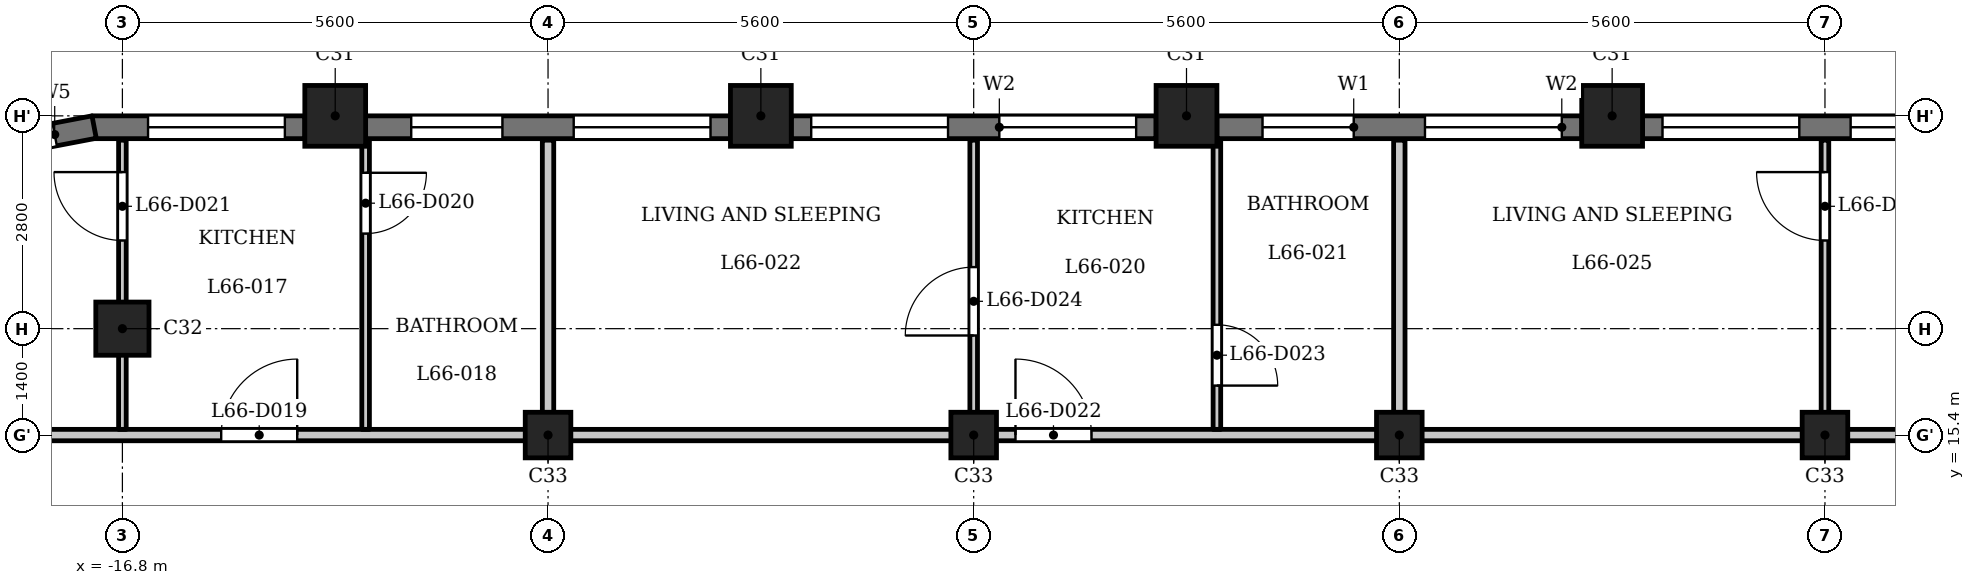
"""IFC4 building model, lengths in metres.
Left out: names, types, materials, properties, quantities, classifications, styles, units other than length and angle.
Written with IfcOpenShell. Run it as: python <this file> out.ifc"""

import sys

from ifc_helpers import new_model, si_unit, direction, frame, frame_2d, origin, origin_2d, place, context, subcontext, project, spatial, rectangle, extrude, element, fill, save


model = new_model("IFC4")
c1 = context("Model", 3, precision=1e-05, world=origin(), true_north=direction((0.0, 1.0)))
c2 = subcontext(c1, "Body", "Model", "MODEL_VIEW")
j1 = project(units=[si_unit("LENGTHUNIT", "METRE"), si_unit("PLANEANGLEUNIT", "RADIAN")], contexts=[c1])
p1 = place(None, origin())
s1 = spatial("IfcSite", under=j1, at=p1, CompositionType="ELEMENT")
p2 = place(p1, origin())
s2 = spatial("IfcBuilding", under=s1, at=p2, CompositionType="ELEMENT")
p3 = place(p2, frame((0.0, 0.0, 255.7)))
s3 = spatial("IfcBuildingStorey", under=s2, at=p3, CompositionType="ELEMENT", Elevation=255.7)
for number, where, z_axis, x_axis in (
    (1, (2.8, 19.6, 0.0), (0.0, 0.0, 1.0), (1.0, 0.0, 0.0)),
    (2, (-2.8, 19.6, 0.0), (0.0, 0.0, 1.0), (1.0, 0.0, 0.0)),
    (3, (-8.4, 19.6, 0.0), (0.0, 0.0, 1.0), (1.0, 0.0, 0.0)),
    (4, (-14.0, 19.6, 0.0), (0.0, 0.0, 1.0), (1.0, 0.0, 0.0)),
):
    element("IfcColumn", number, at=place(p3, frame(where, z_axis=z_axis, x_axis=x_axis)), inside=s3, PredefinedType="COLUMN", context=c2, shape_type="SweptSolid", body=[
        extrude(rectangle(XDim=0.8, YDim=0.8, at=origin_2d()), origin(), (0.0, 0.0, 1.0), 3.5),
    ])
p4 = place(p3, frame((-16.8, 16.8, 0.0), z_axis=(0.0, 0.0, 1.0), x_axis=(1.0, 0.0, 0.0)))
e5 = element("IfcColumn", 5, at=p4, inside=s3, PredefinedType="COLUMN", context=c2, shape_type="SweptSolid", body=[
    extrude(rectangle(XDim=0.7, YDim=0.7, at=origin_2d()), origin(), (0.0, 0.0, 1.0), 3.5),
])
for number, where, z_axis, x_axis in (
    (6, (-11.2, 15.4, 0.0), (0.0, 0.0, 1.0), (1.0, 0.0, 0.0)),
    (7, (-5.6, 15.4, 0.0), (0.0, 0.0, 1.0), (1.0, 0.0, 0.0)),
    (8, (0.0, 15.4, 0.0), (0.0, 0.0, 1.0), (1.0, 0.0, 0.0)),
    (9, (5.6, 15.4, 0.0), (0.0, 0.0, 1.0), (1.0, 0.0, 0.0)),
):
    element("IfcColumn", number, at=place(p3, frame(where, z_axis=z_axis, x_axis=x_axis)), inside=s3, PredefinedType="COLUMN", context=c2, shape_type="SweptSolid", body=[
        extrude(rectangle(XDim=0.6, YDim=0.6, at=origin_2d()), origin(), (0.0, 0.0, 1.0), 3.5),
    ])
p5 = place(p3, frame((8.0, 19.45, 0.0), z_axis=(0.0, 0.0, 1.0), x_axis=(-1.0, 0.0, 0.0)))
e10 = element("IfcWall", 10, at=p5, inside=s3, PredefinedType="SOLIDWALL", context=c2, shape_type="SweptSolid", body=[
    extrude(rectangle(XDim=4.8, YDim=0.3, at=frame_2d((2.4, 0.0))), origin(), (0.0, 0.0, 1.0), 2.55),
])
p6 = place(p5, frame((0.262, 0.0, 0.9)))
e11 = element("IfcOpeningElement", 11, at=p6, cuts=e10, PredefinedType="OPENING", context=c2, shape_type="SweptSolid", body=[
    extrude(rectangle(XDim=1.8, YDim=1.25, at=frame_2d((0.9, 0.625))), frame((0.0, 0.16, 0.0), z_axis=(0.0, -1.0, 0.0), x_axis=(1.0, 0.0, 0.0)), (0.0, 0.0, 1.0), 0.32),
])
p7 = place(p5, frame((2.738, 0.0, 0.9)))
e12 = element("IfcOpeningElement", 12, at=p7, cuts=e10, PredefinedType="OPENING", context=c2, shape_type="SweptSolid", body=[
    extrude(rectangle(XDim=1.8, YDim=1.25, at=frame_2d((0.9, 0.625))), frame((0.0, 0.16, 0.0), z_axis=(0.0, -1.0, 0.0), x_axis=(1.0, 0.0, 0.0)), (0.0, 0.0, 1.0), 0.32),
])
p8 = place(p3, frame((2.4, 19.45, 0.0), z_axis=(0.0, 0.0, 1.0), x_axis=(-1.0, 0.0, 0.0)))
e13 = element("IfcWall", 13, at=p8, inside=s3, PredefinedType="SOLIDWALL", context=c2, shape_type="SweptSolid", body=[
    extrude(rectangle(XDim=4.8, YDim=0.3, at=frame_2d((2.4, 0.0))), origin(), (0.0, 0.0, 1.0), 2.55),
])
p9 = place(p8, frame((0.262, 0.0, 0.9)))
e14 = element("IfcOpeningElement", 14, at=p9, cuts=e13, PredefinedType="OPENING", context=c2, shape_type="SweptSolid", body=[
    extrude(rectangle(XDim=1.8, YDim=1.25, at=frame_2d((0.9, 0.625))), frame((0.0, 0.16, 0.0), z_axis=(0.0, -1.0, 0.0), x_axis=(1.0, 0.0, 0.0)), (0.0, 0.0, 1.0), 0.32),
])
p10 = place(p8, frame((3.0, 0.0, 0.6)))
e15 = element("IfcOpeningElement", 15, at=p10, cuts=e13, PredefinedType="OPENING", context=c2, shape_type="SweptSolid", body=[
    extrude(rectangle(XDim=1.2, YDim=1.55, at=frame_2d((0.6, 0.775))), frame((0.0, 0.16, 0.0), z_axis=(0.0, -1.0, 0.0), x_axis=(1.0, 0.0, 0.0)), (0.0, 0.0, 1.0), 0.32),
])
p11 = place(p3, frame((-3.2, 19.45, 0.0), z_axis=(0.0, 0.0, 1.0), x_axis=(-1.0, 0.0, 0.0)))
e16 = element("IfcWall", 16, at=p11, inside=s3, PredefinedType="SOLIDWALL", context=c2, shape_type="SweptSolid", body=[
    extrude(rectangle(XDim=4.8, YDim=0.3, at=frame_2d((2.4, 0.0))), origin(), (0.0, 0.0, 1.0), 2.55),
])
p12 = place(p11, frame((0.262, 0.0, 0.9)))
e17 = element("IfcOpeningElement", 17, at=p12, cuts=e16, PredefinedType="OPENING", context=c2, shape_type="SweptSolid", body=[
    extrude(rectangle(XDim=1.8, YDim=1.25, at=frame_2d((0.9, 0.625))), frame((0.0, 0.16, 0.0), z_axis=(0.0, -1.0, 0.0), x_axis=(1.0, 0.0, 0.0)), (0.0, 0.0, 1.0), 0.32),
])
p13 = place(p11, frame((2.738, 0.0, 0.9)))
e18 = element("IfcOpeningElement", 18, at=p13, cuts=e16, PredefinedType="OPENING", context=c2, shape_type="SweptSolid", body=[
    extrude(rectangle(XDim=1.8, YDim=1.25, at=frame_2d((0.9, 0.625))), frame((0.0, 0.16, 0.0), z_axis=(0.0, -1.0, 0.0), x_axis=(1.0, 0.0, 0.0)), (0.0, 0.0, 1.0), 0.32),
])
p14 = place(p3, frame((-8.8, 19.45, 0.0), z_axis=(0.0, 0.0, 1.0), x_axis=(-1.0, 0.0, 0.0)))
e19 = element("IfcWall", 19, at=p14, inside=s3, PredefinedType="SOLIDWALL", context=c2, shape_type="SweptSolid", body=[
    extrude(rectangle(XDim=4.8, YDim=0.3, at=frame_2d((2.4, 0.0))), origin(), (0.0, 0.0, 1.0), 2.55),
])
p15 = place(p14, frame((0.262, 0.0, 0.9)))
e20 = element("IfcOpeningElement", 20, at=p15, cuts=e19, PredefinedType="OPENING", context=c2, shape_type="SweptSolid", body=[
    extrude(rectangle(XDim=1.8, YDim=1.25, at=frame_2d((0.9, 0.625))), frame((0.0, 0.16, 0.0), z_axis=(0.0, -1.0, 0.0), x_axis=(1.0, 0.0, 0.0)), (0.0, 0.0, 1.0), 0.32),
])
p16 = place(p14, frame((3.0, 0.0, 0.6)))
e21 = element("IfcOpeningElement", 21, at=p16, cuts=e19, PredefinedType="OPENING", context=c2, shape_type="SweptSolid", body=[
    extrude(rectangle(XDim=1.2, YDim=1.55, at=frame_2d((0.6, 0.775))), frame((0.0, 0.16, 0.0), z_axis=(0.0, -1.0, 0.0), x_axis=(1.0, 0.0, 0.0)), (0.0, 0.0, 1.0), 0.32),
])
p17 = place(p3, frame((-14.4, 19.45, 0.0), z_axis=(0.0, 0.0, 1.0), x_axis=(-1.0, 0.0, 0.0)))
e22 = element("IfcWall", 22, at=p17, inside=s3, PredefinedType="SOLIDWALL", context=c2, shape_type="SweptSolid", body=[
    extrude(rectangle(XDim=2.8, YDim=0.3, at=frame_2d((1.4, 0.0))), origin(), (0.0, 0.0, 1.0), 2.55),
])
p18 = place(p17, frame((0.262, 0.0, 0.9)))
e23 = element("IfcOpeningElement", 23, at=p18, cuts=e22, PredefinedType="OPENING", context=c2, shape_type="SweptSolid", body=[
    extrude(rectangle(XDim=1.8, YDim=1.25, at=frame_2d((0.9, 0.625))), frame((0.0, 0.16, 0.0), z_axis=(0.0, -1.0, 0.0), x_axis=(1.0, 0.0, 0.0)), (0.0, 0.0, 1.0), 0.32),
])
p19 = place(p3, frame((-17.172, 19.453, 0.0), z_axis=(0.0, 0.0, 1.0), x_axis=(-0.982301706131, -0.187305520826, 0.0)))
e24 = element("IfcWall", 24, at=p19, inside=s3, PredefinedType="SOLIDWALL", context=c2, shape_type="SweptSolid", body=[
    extrude(rectangle(XDim=1.856, YDim=0.3, at=frame_2d((0.928, 0.0))), origin(), (0.0, 0.0, 1.0), 2.55),
])
p20 = place(p19, frame((0.528, 0.0, 0.6)))
e25 = element("IfcOpeningElement", 25, at=p20, cuts=e24, PredefinedType="OPENING", context=c2, shape_type="SweptSolid", body=[
    extrude(rectangle(XDim=0.8, YDim=1.55, at=frame_2d((0.4, 0.775))), frame((0.0, 0.16, 0.0), z_axis=(0.0, -1.0, 0.0), x_axis=(1.0, 0.0, 0.0)), (0.0, 0.0, 1.0), 0.32),
])
p21 = place(p3, frame((-23.55, 15.4, 0.0), z_axis=(0.0, 0.0, 1.0), x_axis=(1.0, 0.0, 0.0)))
e26 = element("IfcWall", 26, at=p21, inside=s3, PredefinedType="PARTITIONING", context=c2, shape_type="SweptSolid", body=[
    extrude(rectangle(XDim=46.872, YDim=0.15, at=frame_2d((23.436, 0.0))), origin(), (0.0, 0.0, 1.0), 3.2),
])
p22 = place(p21, frame((8.05, 0.0, 0.0)))
e27 = element("IfcOpeningElement", 27, at=p22, cuts=e26, PredefinedType="OPENING", context=c2, shape_type="SweptSolid", body=[
    extrude(rectangle(XDim=1.0, YDim=2.1, at=frame_2d((0.5, 1.05))), frame((0.0, 0.085, 0.0), z_axis=(0.0, -1.0, 0.0), x_axis=(1.0, 0.0, 0.0)), (0.0, 0.0, 1.0), 0.17),
])
p23 = place(p21, frame((18.5, 0.0, 0.0)))
e28 = element("IfcOpeningElement", 28, at=p23, cuts=e26, PredefinedType="OPENING", context=c2, shape_type="SweptSolid", body=[
    extrude(rectangle(XDim=1.0, YDim=2.1, at=frame_2d((0.5, 1.05))), frame((0.0, 0.085, 0.0), z_axis=(0.0, -1.0, 0.0), x_axis=(1.0, 0.0, 0.0)), (0.0, 0.0, 1.0), 0.17),
])
p24 = place(p21, frame((30.7, 0.0, 0.0)))
e29 = element("IfcOpeningElement", 29, at=p24, cuts=e26, PredefinedType="OPENING", context=c2, shape_type="SweptSolid", body=[
    extrude(rectangle(XDim=1.0, YDim=2.1, at=frame_2d((0.5, 1.05))), frame((0.0, 0.085, 0.0), z_axis=(0.0, -1.0, 0.0), x_axis=(1.0, 0.0, 0.0)), (0.0, 0.0, 1.0), 0.17),
])
p25 = place(p21, frame((37.7, 0.0, 0.0)))
e30 = element("IfcOpeningElement", 30, at=p25, cuts=e26, PredefinedType="OPENING", context=c2, shape_type="SweptSolid", body=[
    extrude(rectangle(XDim=1.0, YDim=2.1, at=frame_2d((0.5, 1.05))), frame((0.0, 0.085, 0.0), z_axis=(0.0, -1.0, 0.0), x_axis=(1.0, 0.0, 0.0)), (0.0, 0.0, 1.0), 0.17),
])
p26 = place(p3, frame((-16.8, 15.475, 0.0), z_axis=(0.0, 0.0, 1.0), x_axis=(0.0, 1.0, 0.0)))
e31 = element("IfcWall", 31, at=p26, inside=s3, PredefinedType="PARTITIONING", context=c2, shape_type="SweptSolid", body=[
    extrude(rectangle(XDim=3.805, YDim=0.1, at=frame_2d((1.902, 0.0))), origin(), (0.0, 0.0, 1.0), 3.2),
])
p27 = place(p26, frame((2.485, 0.0, 0.0)))
e32 = element("IfcOpeningElement", 32, at=p27, cuts=e31, PredefinedType="OPENING", context=c2, shape_type="SweptSolid", body=[
    extrude(rectangle(XDim=0.9, YDim=2.1, at=frame_2d((0.45, 1.05))), frame((0.0, 0.06, 0.0), z_axis=(0.0, -1.0, 0.0), x_axis=(1.0, 0.0, 0.0)), (0.0, 0.0, 1.0), 0.12),
])
p28 = place(p3, frame((-13.6, 15.475, 0.0), z_axis=(0.0, 0.0, 1.0), x_axis=(0.0, 1.0, 0.0)))
e33 = element("IfcWall", 33, at=p28, inside=s3, PredefinedType="PARTITIONING", context=c2, shape_type="SweptSolid", body=[
    extrude(rectangle(XDim=3.805, YDim=0.1, at=frame_2d((1.902, 0.0))), origin(), (0.0, 0.0, 1.0), 3.2),
])
p29 = place(p28, frame((2.576, 0.0, 0.0)))
e34 = element("IfcOpeningElement", 34, at=p29, cuts=e33, PredefinedType="OPENING", context=c2, shape_type="SweptSolid", body=[
    extrude(rectangle(XDim=0.8, YDim=2.1, at=frame_2d((0.4, 1.05))), frame((0.0, 0.06, 0.0), z_axis=(0.0, -1.0, 0.0), x_axis=(1.0, 0.0, 0.0)), (0.0, 0.0, 1.0), 0.12),
])
p30 = place(p3, frame((-11.2, 15.475, 0.0), z_axis=(0.0, 0.0, 1.0), x_axis=(0.0, 1.0, 0.0)))
e35 = element("IfcWall", 35, at=p30, inside=s3, PredefinedType="PARTITIONING", context=c2, shape_type="SweptSolid", body=[
    extrude(rectangle(XDim=3.805, YDim=0.15, at=frame_2d((1.902, 0.0))), origin(), (0.0, 0.0, 1.0), 3.2),
])
p31 = place(p3, frame((-5.6, 15.475, 0.0), z_axis=(0.0, 0.0, 1.0), x_axis=(0.0, 1.0, 0.0)))
e36 = element("IfcWall", 36, at=p31, inside=s3, PredefinedType="PARTITIONING", context=c2, shape_type="SweptSolid", body=[
    extrude(rectangle(XDim=3.805, YDim=0.1, at=frame_2d((1.902, 0.0))), origin(), (0.0, 0.0, 1.0), 3.2),
])
p32 = place(p31, frame((1.235, 0.0, 0.0)))
e37 = element("IfcOpeningElement", 37, at=p32, cuts=e36, PredefinedType="OPENING", context=c2, shape_type="SweptSolid", body=[
    extrude(rectangle(XDim=0.9, YDim=2.1, at=frame_2d((0.45, 1.05))), frame((0.0, 0.06, 0.0), z_axis=(0.0, -1.0, 0.0), x_axis=(1.0, 0.0, 0.0)), (0.0, 0.0, 1.0), 0.12),
])
p33 = place(p3, frame((-2.4, 15.475, 0.0), z_axis=(0.0, 0.0, 1.0), x_axis=(0.0, 1.0, 0.0)))
e38 = element("IfcWall", 38, at=p33, inside=s3, PredefinedType="PARTITIONING", context=c2, shape_type="SweptSolid", body=[
    extrude(rectangle(XDim=3.805, YDim=0.1, at=frame_2d((1.902, 0.0))), origin(), (0.0, 0.0, 1.0), 3.2),
])
p34 = place(p33, frame((0.576, 0.0, 0.0)))
e39 = element("IfcOpeningElement", 39, at=p34, cuts=e38, PredefinedType="OPENING", context=c2, shape_type="SweptSolid", body=[
    extrude(rectangle(XDim=0.8, YDim=2.1, at=frame_2d((0.4, 1.05))), frame((0.0, 0.06, 0.0), z_axis=(0.0, -1.0, 0.0), x_axis=(1.0, 0.0, 0.0)), (0.0, 0.0, 1.0), 0.12),
])
p35 = place(p3, frame((0.0, 15.475, 0.0), z_axis=(0.0, 0.0, 1.0), x_axis=(0.0, 1.0, 0.0)))
e40 = element("IfcWall", 40, at=p35, inside=s3, PredefinedType="PARTITIONING", context=c2, shape_type="SweptSolid", body=[
    extrude(rectangle(XDim=3.805, YDim=0.15, at=frame_2d((1.902, 0.0))), origin(), (0.0, 0.0, 1.0), 3.2),
])
p36 = place(p3, frame((5.6, 15.475, 0.0), z_axis=(0.0, 0.0, 1.0), x_axis=(0.0, 1.0, 0.0)))
e41 = element("IfcWall", 41, at=p36, inside=s3, PredefinedType="PARTITIONING", context=c2, shape_type="SweptSolid", body=[
    extrude(rectangle(XDim=3.805, YDim=0.1, at=frame_2d((1.902, 0.0))), origin(), (0.0, 0.0, 1.0), 3.2),
])
p37 = place(p36, frame((2.485, 0.0, 0.0)))
e42 = element("IfcOpeningElement", 42, at=p37, cuts=e41, PredefinedType="OPENING", context=c2, shape_type="SweptSolid", body=[
    extrude(rectangle(XDim=0.9, YDim=2.1, at=frame_2d((0.45, 1.05))), frame((0.0, 0.06, 0.0), z_axis=(0.0, -1.0, 0.0), x_axis=(1.0, 0.0, 0.0)), (0.0, 0.0, 1.0), 0.12),
])
p38 = place(p22, origin())
e43 = element("IfcDoor", 43, at=p38, inside=s3, OperationType="SINGLE_SWING_LEFT", PredefinedType="DOOR", context=c2, shape_type="SweptSolid", body=[
    extrude(rectangle(XDim=1.0, YDim=2.1, at=frame_2d((0.5, 1.05))), frame((0.0, 0.025, 0.0), z_axis=(0.0, -1.0, 0.0), x_axis=(1.0, 0.0, 0.0)), (0.0, 0.0, 1.0), 0.05),
])
fill(e27, e43)
p39 = place(p29, origin())
e44 = element("IfcDoor", 44, at=p39, inside=s3, OperationType="SINGLE_SWING_RIGHT", PredefinedType="DOOR", context=c2, shape_type="SweptSolid", body=[
    extrude(rectangle(XDim=0.8, YDim=2.1, at=frame_2d((0.4, 1.05))), frame((0.0, 0.025, 0.0), z_axis=(0.0, -1.0, 0.0), x_axis=(1.0, 0.0, 0.0)), (0.0, 0.0, 1.0), 0.05),
])
fill(e34, e44)
p40 = place(p27, origin())
e45 = element("IfcDoor", 45, at=p40, inside=s3, OperationType="SINGLE_SWING_LEFT", PredefinedType="DOOR", context=c2, shape_type="SweptSolid", body=[
    extrude(rectangle(XDim=0.9, YDim=2.1, at=frame_2d((0.45, 1.05))), frame((0.0, 0.025, 0.0), z_axis=(0.0, -1.0, 0.0), x_axis=(1.0, 0.0, 0.0)), (0.0, 0.0, 1.0), 0.05),
])
fill(e32, e45)
p41 = place(p23, origin())
e46 = element("IfcDoor", 46, at=p41, inside=s3, OperationType="SINGLE_SWING_RIGHT", PredefinedType="DOOR", context=c2, shape_type="SweptSolid", body=[
    extrude(rectangle(XDim=1.0, YDim=2.1, at=frame_2d((0.5, 1.05))), frame((0.0, 0.025, 0.0), z_axis=(0.0, -1.0, 0.0), x_axis=(1.0, 0.0, 0.0)), (0.0, 0.0, 1.0), 0.05),
])
fill(e28, e46)
p42 = place(p34, origin())
e47 = element("IfcDoor", 47, at=p42, inside=s3, OperationType="SINGLE_SWING_LEFT", PredefinedType="DOOR", context=c2, shape_type="SweptSolid", body=[
    extrude(rectangle(XDim=0.8, YDim=2.1, at=frame_2d((0.4, 1.05))), frame((0.0, 0.025, 0.0), z_axis=(0.0, -1.0, 0.0), x_axis=(1.0, 0.0, 0.0)), (0.0, 0.0, 1.0), 0.05),
])
fill(e39, e47)
p43 = place(p32, origin())
e48 = element("IfcDoor", 48, at=p43, inside=s3, OperationType="SINGLE_SWING_RIGHT", PredefinedType="DOOR", context=c2, shape_type="SweptSolid", body=[
    extrude(rectangle(XDim=0.9, YDim=2.1, at=frame_2d((0.45, 1.05))), frame((0.0, 0.025, 0.0), z_axis=(0.0, -1.0, 0.0), x_axis=(1.0, 0.0, 0.0)), (0.0, 0.0, 1.0), 0.05),
])
fill(e37, e48)
p44 = place(p37, origin())
e49 = element("IfcDoor", 49, at=p44, inside=s3, OperationType="SINGLE_SWING_LEFT", PredefinedType="DOOR", context=c2, shape_type="SweptSolid", body=[
    extrude(rectangle(XDim=0.9, YDim=2.1, at=frame_2d((0.45, 1.05))), frame((0.0, 0.025, 0.0), z_axis=(0.0, -1.0, 0.0), x_axis=(1.0, 0.0, 0.0)), (0.0, 0.0, 1.0), 0.05),
])
fill(e42, e49)
p45 = place(p6, origin())
e50 = element("IfcWindow", 50, at=p45, inside=s3, PartitioningType="SINGLE_PANEL", PredefinedType="WINDOW", context=c2, shape_type="SweptSolid", body=[
    extrude(rectangle(XDim=1.8, YDim=1.25, at=frame_2d((0.9, 0.625))), frame((0.0, 0.03, 0.0), z_axis=(0.0, -1.0, 0.0), x_axis=(1.0, 0.0, 0.0)), (0.0, 0.0, 1.0), 0.06),
])
fill(e11, e50)
p46 = place(p7, origin())
e51 = element("IfcWindow", 51, at=p46, inside=s3, PartitioningType="SINGLE_PANEL", PredefinedType="WINDOW", context=c2, shape_type="SweptSolid", body=[
    extrude(rectangle(XDim=1.8, YDim=1.25, at=frame_2d((0.9, 0.625))), frame((0.0, 0.03, 0.0), z_axis=(0.0, -1.0, 0.0), x_axis=(1.0, 0.0, 0.0)), (0.0, 0.0, 1.0), 0.06),
])
fill(e12, e51)
p47 = place(p9, origin())
e52 = element("IfcWindow", 52, at=p47, inside=s3, PartitioningType="SINGLE_PANEL", PredefinedType="WINDOW", context=c2, shape_type="SweptSolid", body=[
    extrude(rectangle(XDim=1.8, YDim=1.25, at=frame_2d((0.9, 0.625))), frame((0.0, 0.03, 0.0), z_axis=(0.0, -1.0, 0.0), x_axis=(1.0, 0.0, 0.0)), (0.0, 0.0, 1.0), 0.06),
])
fill(e14, e52)
p48 = place(p10, origin())
e53 = element("IfcWindow", 53, at=p48, inside=s3, PartitioningType="SINGLE_PANEL", PredefinedType="WINDOW", context=c2, shape_type="SweptSolid", body=[
    extrude(rectangle(XDim=1.2, YDim=1.55, at=frame_2d((0.6, 0.775))), frame((0.0, 0.03, 0.0), z_axis=(0.0, -1.0, 0.0), x_axis=(1.0, 0.0, 0.0)), (0.0, 0.0, 1.0), 0.06),
])
fill(e15, e53)
p49 = place(p12, origin())
e54 = element("IfcWindow", 54, at=p49, inside=s3, PartitioningType="SINGLE_PANEL", PredefinedType="WINDOW", context=c2, shape_type="SweptSolid", body=[
    extrude(rectangle(XDim=1.8, YDim=1.25, at=frame_2d((0.9, 0.625))), frame((0.0, 0.03, 0.0), z_axis=(0.0, -1.0, 0.0), x_axis=(1.0, 0.0, 0.0)), (0.0, 0.0, 1.0), 0.06),
])
fill(e17, e54)
p50 = place(p13, origin())
e55 = element("IfcWindow", 55, at=p50, inside=s3, PartitioningType="SINGLE_PANEL", PredefinedType="WINDOW", context=c2, shape_type="SweptSolid", body=[
    extrude(rectangle(XDim=1.8, YDim=1.25, at=frame_2d((0.9, 0.625))), frame((0.0, 0.03, 0.0), z_axis=(0.0, -1.0, 0.0), x_axis=(1.0, 0.0, 0.0)), (0.0, 0.0, 1.0), 0.06),
])
fill(e18, e55)
p51 = place(p15, origin())
e56 = element("IfcWindow", 56, at=p51, inside=s3, PartitioningType="SINGLE_PANEL", PredefinedType="WINDOW", context=c2, shape_type="SweptSolid", body=[
    extrude(rectangle(XDim=1.8, YDim=1.25, at=frame_2d((0.9, 0.625))), frame((0.0, 0.03, 0.0), z_axis=(0.0, -1.0, 0.0), x_axis=(1.0, 0.0, 0.0)), (0.0, 0.0, 1.0), 0.06),
])
fill(e20, e56)
p52 = place(p16, origin())
e57 = element("IfcWindow", 57, at=p52, inside=s3, PartitioningType="SINGLE_PANEL", PredefinedType="WINDOW", context=c2, shape_type="SweptSolid", body=[
    extrude(rectangle(XDim=1.2, YDim=1.55, at=frame_2d((0.6, 0.775))), frame((0.0, 0.03, 0.0), z_axis=(0.0, -1.0, 0.0), x_axis=(1.0, 0.0, 0.0)), (0.0, 0.0, 1.0), 0.06),
])
fill(e21, e57)
p53 = place(p18, origin())
e58 = element("IfcWindow", 58, at=p53, inside=s3, PartitioningType="SINGLE_PANEL", PredefinedType="WINDOW", context=c2, shape_type="SweptSolid", body=[
    extrude(rectangle(XDim=1.8, YDim=1.25, at=frame_2d((0.9, 0.625))), frame((0.0, 0.03, 0.0), z_axis=(0.0, -1.0, 0.0), x_axis=(1.0, 0.0, 0.0)), (0.0, 0.0, 1.0), 0.06),
])
fill(e23, e58)
p54 = place(p20, origin())
e59 = element("IfcWindow", 59, at=p54, inside=s3, PartitioningType="SINGLE_PANEL", PredefinedType="WINDOW", context=c2, shape_type="SweptSolid", body=[
    extrude(rectangle(XDim=0.8, YDim=1.55, at=frame_2d((0.4, 0.775))), frame((0.0, 0.03, 0.0), z_axis=(0.0, -1.0, 0.0), x_axis=(1.0, 0.0, 0.0)), (0.0, 0.0, 1.0), 0.06),
])
fill(e25, e59)
save(model, sys.argv[1])
